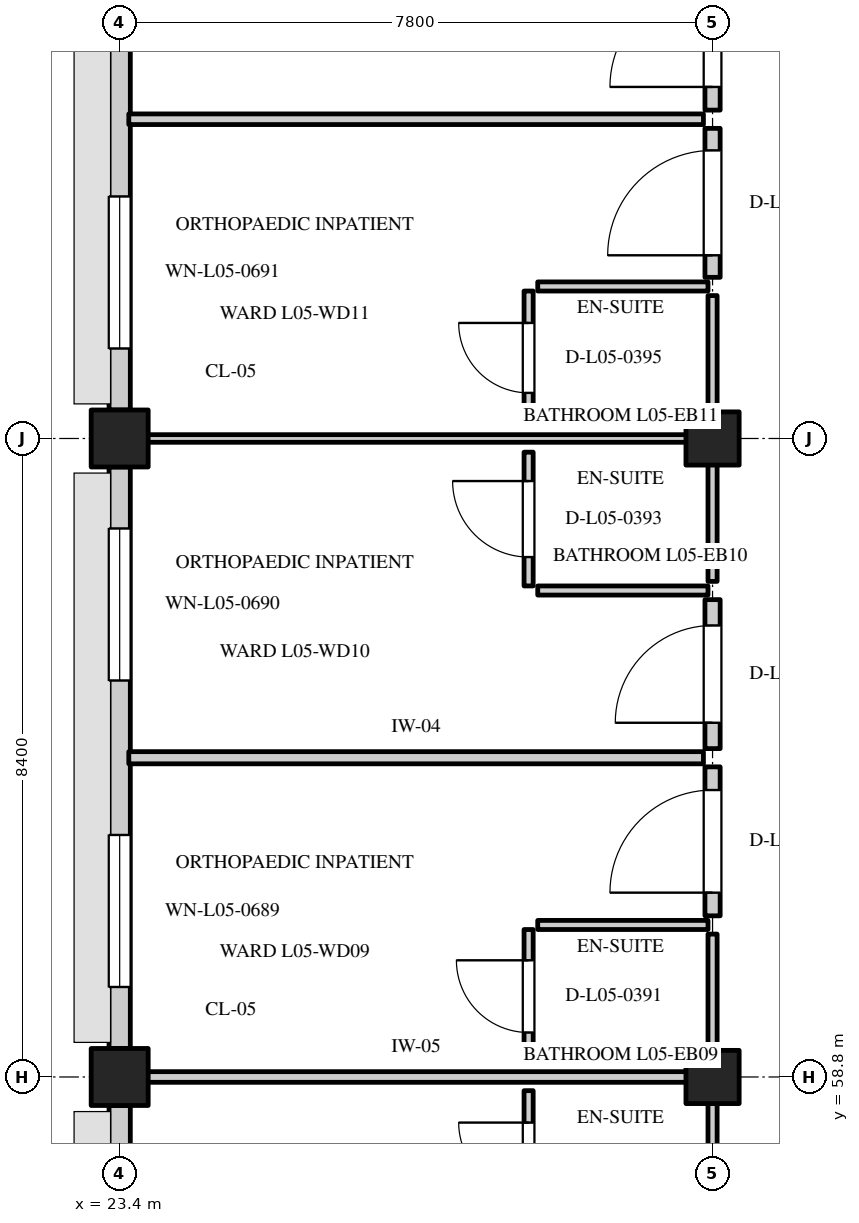
"""IFC4 building model, lengths in metres.
Left out: names, types, materials, properties, quantities, classifications, styles, units other than length and angle.
Written with IfcOpenShell. Run it as: python <this file> out.ifc"""

import sys

from ifc_helpers import new_model, si_unit, direction, frame, frame_2d, origin, origin_2d, place, context, subcontext, project, spatial, rectangle, extrude, element, fill, save


model = new_model("IFC4")
c1 = context("Model", 3, precision=1e-05, world=origin(), true_north=direction((0.0, 1.0)))
c2 = subcontext(c1, "Body", "Model", "MODEL_VIEW")
j1 = project(units=[si_unit("LENGTHUNIT", "METRE"), si_unit("PLANEANGLEUNIT", "RADIAN")], contexts=[c1])
p1 = place(None, origin())
s1 = spatial("IfcSite", under=j1, at=p1, CompositionType="ELEMENT")
p2 = place(p1, origin())
s2 = spatial("IfcBuilding", under=s1, at=p2, CompositionType="ELEMENT")
p3 = place(p2, frame((0.0, 0.0, 22.2)))
s3 = spatial("IfcBuildingStorey", under=s2, at=p3, CompositionType="ELEMENT", Elevation=22.2)
for number, where, z_axis, x_axis in (
    (1, (23.4, 58.8, 0.0), (0.0, 0.0, 1.0), (1.0, 0.0, 0.0)),
    (2, (23.4, 67.2, 0.0), (0.0, 0.0, 1.0), (1.0, 0.0, 0.0)),
):
    element("IfcColumn", number, at=place(p3, frame(where, z_axis=z_axis, x_axis=x_axis)), inside=s3, PredefinedType="COLUMN", context=c2, shape_type="SweptSolid", body=[
        extrude(rectangle(XDim=0.75, YDim=0.75, at=origin_2d()), origin(), (0.0, 0.0, 1.0), 3.9),
    ])
for number, where, z_axis, x_axis in (
    (3, (31.2, 58.8, 0.0), (0.0, 0.0, 1.0), (1.0, 0.0, 0.0)),
    (4, (31.2, 67.2, 0.0), (0.0, 0.0, 1.0), (1.0, 0.0, 0.0)),
):
    element("IfcColumn", number, at=place(p3, frame(where, z_axis=z_axis, x_axis=x_axis)), inside=s3, PredefinedType="COLUMN", context=c2, shape_type="SweptSolid", body=[
        extrude(rectangle(XDim=0.7, YDim=0.7, at=origin_2d()), origin(), (0.0, 0.0, 1.0), 3.9),
    ])
p4 = place(p3, frame((23.4, 50.775, 0.0), z_axis=(0.0, 0.0, 1.0), x_axis=(0.0, 1.0, 0.0)))
e5 = element("IfcWall", 5, at=p4, inside=s3, PredefinedType="STANDARD", context=c2, shape_type="SweptSolid", body=[
    extrude(rectangle(XDim=7.65, YDim=0.28, at=frame_2d((3.825, 0.0))), origin(), (0.0, 0.0, 1.0), 2.95),
])
p5 = place(p4, frame((0.759, 0.0, 0.8)))
e6 = element("IfcOpeningElement", 6, at=p5, cuts=e5, PredefinedType="OPENING", context=c2, shape_type="SweptSolid", body=[
    extrude(rectangle(XDim=2.1, YDim=1.45, at=frame_2d((1.05, 0.725))), frame((0.0, 0.152, 0.0), z_axis=(0.0, -1.0, 0.0), x_axis=(1.0, 0.0, 0.0)), (0.0, 0.0, 1.0), 0.304),
])
p6 = place(p4, frame((4.791, 0.0, 0.8)))
e7 = element("IfcOpeningElement", 7, at=p6, cuts=e5, PredefinedType="OPENING", context=c2, shape_type="SweptSolid", body=[
    extrude(rectangle(XDim=2.1, YDim=1.45, at=frame_2d((1.05, 0.725))), frame((0.0, 0.152, 0.0), z_axis=(0.0, -1.0, 0.0), x_axis=(1.0, 0.0, 0.0)), (0.0, 0.0, 1.0), 0.304),
])
p7 = place(p3, frame((23.4, 59.175, 0.0), z_axis=(0.0, 0.0, 1.0), x_axis=(0.0, 1.0, 0.0)))
e8 = element("IfcWall", 8, at=p7, inside=s3, PredefinedType="STANDARD", context=c2, shape_type="SweptSolid", body=[
    extrude(rectangle(XDim=7.65, YDim=0.28, at=frame_2d((3.825, 0.0))), origin(), (0.0, 0.0, 1.0), 2.95),
])
p8 = place(p7, frame((0.809, 0.0, 0.8)))
e9 = element("IfcOpeningElement", 9, at=p8, cuts=e8, PredefinedType="OPENING", context=c2, shape_type="SweptSolid", body=[
    extrude(rectangle(XDim=2.0, YDim=1.75, at=frame_2d((1.0, 0.875))), frame((0.0, 0.152, 0.0), z_axis=(0.0, -1.0, 0.0), x_axis=(1.0, 0.0, 0.0)), (0.0, 0.0, 1.0), 0.304),
])
p9 = place(p7, frame((4.841, 0.0, 0.8)))
e10 = element("IfcOpeningElement", 10, at=p9, cuts=e8, PredefinedType="OPENING", context=c2, shape_type="SweptSolid", body=[
    extrude(rectangle(XDim=2.0, YDim=1.75, at=frame_2d((1.0, 0.875))), frame((0.0, 0.152, 0.0), z_axis=(0.0, -1.0, 0.0), x_axis=(1.0, 0.0, 0.0)), (0.0, 0.0, 1.0), 0.304),
])
p10 = place(p3, frame((23.4, 67.575, 0.0), z_axis=(0.0, 0.0, 1.0), x_axis=(0.0, 1.0, 0.0)))
e11 = element("IfcWall", 11, at=p10, inside=s3, PredefinedType="STANDARD", context=c2, shape_type="SweptSolid", body=[
    extrude(rectangle(XDim=7.65, YDim=0.28, at=frame_2d((3.825, 0.0))), origin(), (0.0, 0.0, 1.0), 2.95),
])
p11 = place(p10, frame((0.809, 0.0, 0.8)))
e12 = element("IfcOpeningElement", 12, at=p11, cuts=e11, PredefinedType="OPENING", context=c2, shape_type="SweptSolid", body=[
    extrude(rectangle(XDim=2.0, YDim=1.65, at=frame_2d((1.0, 0.825))), frame((0.0, 0.152, 0.0), z_axis=(0.0, -1.0, 0.0), x_axis=(1.0, 0.0, 0.0)), (0.0, 0.0, 1.0), 0.304),
])
p12 = place(p10, frame((4.841, 0.0, 0.8)))
e13 = element("IfcOpeningElement", 13, at=p12, cuts=e11, PredefinedType="OPENING", context=c2, shape_type="SweptSolid", body=[
    extrude(rectangle(XDim=2.0, YDim=1.65, at=frame_2d((1.0, 0.825))), frame((0.0, 0.152, 0.0), z_axis=(0.0, -1.0, 0.0), x_axis=(1.0, 0.0, 0.0)), (0.0, 0.0, 1.0), 0.304),
])
p13 = place(p3, frame((23.52, 58.8, 0.0), z_axis=(0.0, 0.0, 1.0), x_axis=(1.0, 0.0, 0.0)))
e14 = element("IfcWall", 14, at=p13, inside=s3, PredefinedType="PARTITIONING", context=c2, shape_type="SweptSolid", body=[
    extrude(rectangle(XDim=7.56, YDim=0.14, at=frame_2d((3.78, 0.0))), origin(), (0.0, 0.0, 1.0), 2.95),
])
p14 = place(p3, frame((31.2, 56.92, 0.0), z_axis=(0.0, 0.0, 1.0), x_axis=(0.0, 1.0, 0.0)))
e15 = element("IfcWall", 15, at=p14, inside=s3, PredefinedType="PARTITIONING", context=c2, shape_type="SweptSolid", body=[
    extrude(rectangle(XDim=1.76, YDim=0.12, at=frame_2d((0.88, 0.0))), origin(), (0.0, 0.0, 1.0), 3.58),
])
p15 = place(p3, frame((28.78, 56.86, 0.0), z_axis=(0.0, 0.0, 1.0), x_axis=(0.0, 1.0, 0.0)))
e16 = element("IfcWall", 16, at=p15, inside=s3, PredefinedType="PARTITIONING", context=c2, shape_type="SweptSolid", body=[
    extrude(rectangle(XDim=1.76, YDim=0.12, at=frame_2d((0.88, 0.0))), origin(), (0.0, 0.0, 1.0), 3.58),
])
p16 = place(p15, frame((0.42, 0.0, 0.0)))
e17 = element("IfcOpeningElement", 17, at=p16, cuts=e16, PredefinedType="OPENING", context=c2, shape_type="SweptSolid", body=[
    extrude(rectangle(XDim=0.92, YDim=2.08, at=frame_2d((0.46, 1.04))), frame((0.0, 0.072, 0.0), z_axis=(0.0, -1.0, 0.0), x_axis=(1.0, 0.0, 0.0)), (0.0, 0.0, 1.0), 0.144),
])
p17 = place(p3, frame((23.52, 63.0, 0.0), z_axis=(0.0, 0.0, 1.0), x_axis=(1.0, 0.0, 0.0)))
e18 = element("IfcWall", 18, at=p17, inside=s3, PredefinedType="PARTITIONING", context=c2, shape_type="SweptSolid", body=[
    extrude(rectangle(XDim=7.56, YDim=0.16, at=frame_2d((3.78, 0.0))), origin(), (0.0, 0.0, 1.0), 3.58),
])
p18 = place(p3, frame((31.2, 60.92, 0.0), z_axis=(0.0, 0.0, 1.0), x_axis=(0.0, 1.0, 0.0)))
e19 = element("IfcWall", 19, at=p18, inside=s3, PredefinedType="STANDARD", context=c2, shape_type="SweptSolid", body=[
    extrude(rectangle(XDim=1.96, YDim=0.2, at=frame_2d((0.98, 0.0))), origin(), (0.0, 0.0, 1.0), 3.58),
])
p19 = place(p18, frame((0.305, 0.0, 0.0)))
e20 = element("IfcOpeningElement", 20, at=p19, cuts=e19, PredefinedType="OPENING", context=c2, shape_type="SweptSolid", body=[
    extrude(rectangle(XDim=1.35, YDim=2.15, at=frame_2d((0.675, 1.075))), frame((0.0, 0.112, 0.0), z_axis=(0.0, -1.0, 0.0), x_axis=(1.0, 0.0, 0.0)), (0.0, 0.0, 1.0), 0.224),
])
p20 = place(p3, frame((31.2, 58.92, 0.0), z_axis=(0.0, 0.0, 1.0), x_axis=(0.0, 1.0, 0.0)))
e21 = element("IfcWall", 21, at=p20, inside=s3, PredefinedType="PARTITIONING", context=c2, shape_type="SweptSolid", body=[
    extrude(rectangle(XDim=1.76, YDim=0.12, at=frame_2d((0.88, 0.0))), origin(), (0.0, 0.0, 1.0), 3.58),
])
p21 = place(p3, frame((28.9, 60.8, 0.0), z_axis=(0.0, 0.0, 1.0), x_axis=(1.0, 0.0, 0.0)))
e22 = element("IfcWall", 22, at=p21, inside=s3, PredefinedType="PARTITIONING", context=c2, shape_type="SweptSolid", body=[
    extrude(rectangle(XDim=2.24, YDim=0.12, at=frame_2d((1.12, 0.0))), origin(), (0.0, 0.0, 1.0), 3.58),
])
p22 = place(p3, frame((28.78, 58.98, 0.0), z_axis=(0.0, 0.0, 1.0), x_axis=(0.0, 1.0, 0.0)))
e23 = element("IfcWall", 23, at=p22, inside=s3, PredefinedType="PARTITIONING", context=c2, shape_type="SweptSolid", body=[
    extrude(rectangle(XDim=1.76, YDim=0.12, at=frame_2d((0.88, 0.0))), origin(), (0.0, 0.0, 1.0), 3.58),
])
p23 = place(p22, frame((0.405, 0.0, 0.0)))
e24 = element("IfcOpeningElement", 24, at=p23, cuts=e23, PredefinedType="OPENING", context=c2, shape_type="SweptSolid", body=[
    extrude(rectangle(XDim=0.95, YDim=2.1, at=frame_2d((0.475, 1.05))), frame((0.0, 0.072, 0.0), z_axis=(0.0, -1.0, 0.0), x_axis=(1.0, 0.0, 0.0)), (0.0, 0.0, 1.0), 0.144),
])
p24 = place(p3, frame((23.52, 67.2, 0.0), z_axis=(0.0, 0.0, 1.0), x_axis=(1.0, 0.0, 0.0)))
e25 = element("IfcWall", 25, at=p24, inside=s3, PredefinedType="PARTITIONING", context=c2, shape_type="SweptSolid", body=[
    extrude(rectangle(XDim=7.56, YDim=0.1, at=frame_2d((3.78, 0.0))), origin(), (0.0, 0.0, 1.0), 3.58),
])
p25 = place(p3, frame((31.2, 63.12, 0.0), z_axis=(0.0, 0.0, 1.0), x_axis=(0.0, 1.0, 0.0)))
e26 = element("IfcWall", 26, at=p25, inside=s3, PredefinedType="STANDARD", context=c2, shape_type="SweptSolid", body=[
    extrude(rectangle(XDim=1.96, YDim=0.2, at=frame_2d((0.98, 0.0))), origin(), (0.0, 0.0, 1.0), 3.58),
])
p26 = place(p25, frame((0.34, 0.0, 0.0)))
e27 = element("IfcOpeningElement", 27, at=p26, cuts=e26, PredefinedType="OPENING", context=c2, shape_type="SweptSolid", body=[
    extrude(rectangle(XDim=1.28, YDim=2.15, at=frame_2d((0.64, 1.075))), frame((0.0, 0.112, 0.0), z_axis=(0.0, -1.0, 0.0), x_axis=(1.0, 0.0, 0.0)), (0.0, 0.0, 1.0), 0.224),
])
p27 = place(p3, frame((31.2, 65.32, 0.0), z_axis=(0.0, 0.0, 1.0), x_axis=(0.0, 1.0, 0.0)))
e28 = element("IfcWall", 28, at=p27, inside=s3, PredefinedType="PARTITIONING", context=c2, shape_type="SweptSolid", body=[
    extrude(rectangle(XDim=1.76, YDim=0.12, at=frame_2d((0.88, 0.0))), origin(), (0.0, 0.0, 1.0), 3.58),
])
p28 = place(p3, frame((28.9, 65.2, 0.0), z_axis=(0.0, 0.0, 1.0), x_axis=(1.0, 0.0, 0.0)))
e29 = element("IfcWall", 29, at=p28, inside=s3, PredefinedType="PARTITIONING", context=c2, shape_type="SweptSolid", body=[
    extrude(rectangle(XDim=2.24, YDim=0.12, at=frame_2d((1.12, 0.0))), origin(), (0.0, 0.0, 1.0), 3.58),
])
p29 = place(p3, frame((28.78, 65.26, 0.0), z_axis=(0.0, 0.0, 1.0), x_axis=(0.0, 1.0, 0.0)))
e30 = element("IfcWall", 30, at=p29, inside=s3, PredefinedType="PARTITIONING", context=c2, shape_type="SweptSolid", body=[
    extrude(rectangle(XDim=1.76, YDim=0.12, at=frame_2d((0.88, 0.0))), origin(), (0.0, 0.0, 1.0), 3.58),
])
p30 = place(p29, frame((0.38, 0.0, 0.0)))
e31 = element("IfcOpeningElement", 31, at=p30, cuts=e30, PredefinedType="OPENING", context=c2, shape_type="SweptSolid", body=[
    extrude(rectangle(XDim=1.0, YDim=2.1, at=frame_2d((0.5, 1.05))), frame((0.0, 0.072, 0.0), z_axis=(0.0, -1.0, 0.0), x_axis=(1.0, 0.0, 0.0)), (0.0, 0.0, 1.0), 0.144),
])
p31 = place(p3, frame((23.52, 71.4, 0.0), z_axis=(0.0, 0.0, 1.0), x_axis=(1.0, 0.0, 0.0)))
e32 = element("IfcWall", 32, at=p31, inside=s3, PredefinedType="PARTITIONING", context=c2, shape_type="SweptSolid", body=[
    extrude(rectangle(XDim=7.56, YDim=0.14, at=frame_2d((3.78, 0.0))), origin(), (0.0, 0.0, 1.0), 3.58),
])
p32 = place(p3, frame((31.2, 69.32, 0.0), z_axis=(0.0, 0.0, 1.0), x_axis=(0.0, 1.0, 0.0)))
e33 = element("IfcWall", 33, at=p32, inside=s3, PredefinedType="STANDARD", context=c2, shape_type="SweptSolid", body=[
    extrude(rectangle(XDim=1.96, YDim=0.2, at=frame_2d((0.98, 0.0))), origin(), (0.0, 0.0, 1.0), 3.58),
])
p33 = place(p32, frame((0.29, 0.0, 0.0)))
e34 = element("IfcOpeningElement", 34, at=p33, cuts=e33, PredefinedType="OPENING", context=c2, shape_type="SweptSolid", body=[
    extrude(rectangle(XDim=1.38, YDim=2.2, at=frame_2d((0.69, 1.1))), frame((0.0, 0.112, 0.0), z_axis=(0.0, -1.0, 0.0), x_axis=(1.0, 0.0, 0.0)), (0.0, 0.0, 1.0), 0.224),
])
p34 = place(p3, frame((31.2, 67.32, 0.0), z_axis=(0.0, 0.0, 1.0), x_axis=(0.0, 1.0, 0.0)))
e35 = element("IfcWall", 35, at=p34, inside=s3, PredefinedType="PARTITIONING", context=c2, shape_type="SweptSolid", body=[
    extrude(rectangle(XDim=1.76, YDim=0.12, at=frame_2d((0.88, 0.0))), origin(), (0.0, 0.0, 1.0), 3.58),
])
p35 = place(p3, frame((28.9, 69.2, 0.0), z_axis=(0.0, 0.0, 1.0), x_axis=(1.0, 0.0, 0.0)))
e36 = element("IfcWall", 36, at=p35, inside=s3, PredefinedType="PARTITIONING", context=c2, shape_type="SweptSolid", body=[
    extrude(rectangle(XDim=2.24, YDim=0.12, at=frame_2d((1.12, 0.0))), origin(), (0.0, 0.0, 1.0), 3.58),
])
p36 = place(p3, frame((28.78, 67.38, 0.0), z_axis=(0.0, 0.0, 1.0), x_axis=(0.0, 1.0, 0.0)))
e37 = element("IfcWall", 37, at=p36, inside=s3, PredefinedType="PARTITIONING", context=c2, shape_type="SweptSolid", body=[
    extrude(rectangle(XDim=1.76, YDim=0.12, at=frame_2d((0.88, 0.0))), origin(), (0.0, 0.0, 1.0), 3.58),
])
p37 = place(p36, frame((0.42, 0.0, 0.0)))
e38 = element("IfcOpeningElement", 38, at=p37, cuts=e37, PredefinedType="OPENING", context=c2, shape_type="SweptSolid", body=[
    extrude(rectangle(XDim=0.92, YDim=2.08, at=frame_2d((0.46, 1.04))), frame((0.0, 0.072, 0.0), z_axis=(0.0, -1.0, 0.0), x_axis=(1.0, 0.0, 0.0)), (0.0, 0.0, 1.0), 0.144),
])
p38 = place(p3, frame((31.2, 71.52, 0.0), z_axis=(0.0, 0.0, 1.0), x_axis=(0.0, 1.0, 0.0)))
e39 = element("IfcWall", 39, at=p38, inside=s3, PredefinedType="STANDARD", context=c2, shape_type="SweptSolid", body=[
    extrude(rectangle(XDim=1.96, YDim=0.2, at=frame_2d((0.98, 0.0))), origin(), (0.0, 0.0, 1.0), 3.58),
])
p39 = place(p38, frame((0.305, 0.0, 0.0)))
e40 = element("IfcOpeningElement", 40, at=p39, cuts=e39, PredefinedType="OPENING", context=c2, shape_type="SweptSolid", body=[
    extrude(rectangle(XDim=1.35, YDim=2.15, at=frame_2d((0.675, 1.075))), frame((0.0, 0.112, 0.0), z_axis=(0.0, -1.0, 0.0), x_axis=(1.0, 0.0, 0.0)), (0.0, 0.0, 1.0), 0.224),
])
p40 = place(p8, origin())
e41 = element("IfcWindow", 41, at=p40, inside=s3, PartitioningType="DOUBLE_PANEL_VERTICAL", PredefinedType="WINDOW", context=c2, shape_type="SweptSolid", body=[
    extrude(rectangle(XDim=2.0, YDim=1.75, at=frame_2d((1.0, 0.875))), frame((0.0, 0.03, 0.0), z_axis=(0.0, -1.0, 0.0), x_axis=(1.0, 0.0, 0.0)), (0.0, 0.0, 1.0), 0.06),
])
fill(e9, e41)
p41 = place(p9, origin())
e42 = element("IfcWindow", 42, at=p41, inside=s3, PartitioningType="DOUBLE_PANEL_VERTICAL", PredefinedType="WINDOW", context=c2, shape_type="SweptSolid", body=[
    extrude(rectangle(XDim=2.0, YDim=1.75, at=frame_2d((1.0, 0.875))), frame((0.0, 0.03, 0.0), z_axis=(0.0, -1.0, 0.0), x_axis=(1.0, 0.0, 0.0)), (0.0, 0.0, 1.0), 0.06),
])
fill(e10, e42)
p42 = place(p11, origin())
e43 = element("IfcWindow", 43, at=p42, inside=s3, PartitioningType="DOUBLE_PANEL_VERTICAL", PredefinedType="WINDOW", context=c2, shape_type="SweptSolid", body=[
    extrude(rectangle(XDim=2.0, YDim=1.65, at=frame_2d((1.0, 0.825))), frame((0.0, 0.03, 0.0), z_axis=(0.0, -1.0, 0.0), x_axis=(1.0, 0.0, 0.0)), (0.0, 0.0, 1.0), 0.06),
])
fill(e12, e43)
p43 = place(p16, frame((0.92, 0.0, 0.0), z_axis=(0.0, 0.0, 1.0), x_axis=(-1.0, 0.0, 0.0)))
e44 = element("IfcDoor", 44, at=p43, inside=s3, OperationType="SINGLE_SWING_LEFT", PredefinedType="DOOR", context=c2, shape_type="SweptSolid", body=[
    extrude(rectangle(XDim=0.92, YDim=2.08, at=frame_2d((0.46, 1.04))), frame((0.0, 0.025, 0.0), z_axis=(0.0, -1.0, 0.0), x_axis=(1.0, 0.0, 0.0)), (0.0, 0.0, 1.0), 0.05),
])
fill(e17, e44)
p44 = place(p19, origin())
e45 = element("IfcDoor", 45, at=p44, inside=s3, OperationType="SINGLE_SWING_LEFT", PredefinedType="DOOR", context=c2, shape_type="SweptSolid", body=[
    extrude(rectangle(XDim=1.35, YDim=2.15, at=frame_2d((0.675, 1.075))), frame((0.0, 0.025, 0.0), z_axis=(0.0, -1.0, 0.0), x_axis=(1.0, 0.0, 0.0)), (0.0, 0.0, 1.0), 0.05),
])
fill(e20, e45)
p45 = place(p23, frame((0.95, 0.0, 0.0), z_axis=(0.0, 0.0, 1.0), x_axis=(-1.0, 0.0, 0.0)))
e46 = element("IfcDoor", 46, at=p45, inside=s3, OperationType="SINGLE_SWING_LEFT", PredefinedType="DOOR", context=c2, shape_type="SweptSolid", body=[
    extrude(rectangle(XDim=0.95, YDim=2.1, at=frame_2d((0.475, 1.05))), frame((0.0, 0.025, 0.0), z_axis=(0.0, -1.0, 0.0), x_axis=(1.0, 0.0, 0.0)), (0.0, 0.0, 1.0), 0.05),
])
fill(e24, e46)
p46 = place(p26, origin())
e47 = element("IfcDoor", 47, at=p46, inside=s3, OperationType="SINGLE_SWING_LEFT", PredefinedType="DOOR", context=c2, shape_type="SweptSolid", body=[
    extrude(rectangle(XDim=1.28, YDim=2.15, at=frame_2d((0.64, 1.075))), frame((0.0, 0.025, 0.0), z_axis=(0.0, -1.0, 0.0), x_axis=(1.0, 0.0, 0.0)), (0.0, 0.0, 1.0), 0.05),
])
fill(e27, e47)
p47 = place(p30, frame((1.0, 0.0, 0.0), z_axis=(0.0, 0.0, 1.0), x_axis=(-1.0, 0.0, 0.0)))
e48 = element("IfcDoor", 48, at=p47, inside=s3, OperationType="SINGLE_SWING_LEFT", PredefinedType="DOOR", context=c2, shape_type="SweptSolid", body=[
    extrude(rectangle(XDim=1.0, YDim=2.1, at=frame_2d((0.5, 1.05))), frame((0.0, 0.025, 0.0), z_axis=(0.0, -1.0, 0.0), x_axis=(1.0, 0.0, 0.0)), (0.0, 0.0, 1.0), 0.05),
])
fill(e31, e48)
p48 = place(p33, origin())
e49 = element("IfcDoor", 49, at=p48, inside=s3, OperationType="SINGLE_SWING_LEFT", PredefinedType="DOOR", context=c2, shape_type="SweptSolid", body=[
    extrude(rectangle(XDim=1.38, YDim=2.2, at=frame_2d((0.69, 1.1))), frame((0.0, 0.025, 0.0), z_axis=(0.0, -1.0, 0.0), x_axis=(1.0, 0.0, 0.0)), (0.0, 0.0, 1.0), 0.05),
])
fill(e34, e49)
p49 = place(p37, frame((0.92, 0.0, 0.0), z_axis=(0.0, 0.0, 1.0), x_axis=(-1.0, 0.0, 0.0)))
e50 = element("IfcDoor", 50, at=p49, inside=s3, OperationType="SINGLE_SWING_LEFT", PredefinedType="DOOR", context=c2, shape_type="SweptSolid", body=[
    extrude(rectangle(XDim=0.92, YDim=2.08, at=frame_2d((0.46, 1.04))), frame((0.0, 0.025, 0.0), z_axis=(0.0, -1.0, 0.0), x_axis=(1.0, 0.0, 0.0)), (0.0, 0.0, 1.0), 0.05),
])
fill(e38, e50)
p50 = place(p39, origin())
e51 = element("IfcDoor", 51, at=p50, inside=s3, OperationType="SINGLE_SWING_LEFT", PredefinedType="DOOR", context=c2, shape_type="SweptSolid", body=[
    extrude(rectangle(XDim=1.35, YDim=2.15, at=frame_2d((0.675, 1.075))), frame((0.0, 0.025, 0.0), z_axis=(0.0, -1.0, 0.0), x_axis=(1.0, 0.0, 0.0)), (0.0, 0.0, 1.0), 0.05),
])
fill(e40, e51)
save(model, sys.argv[1])
